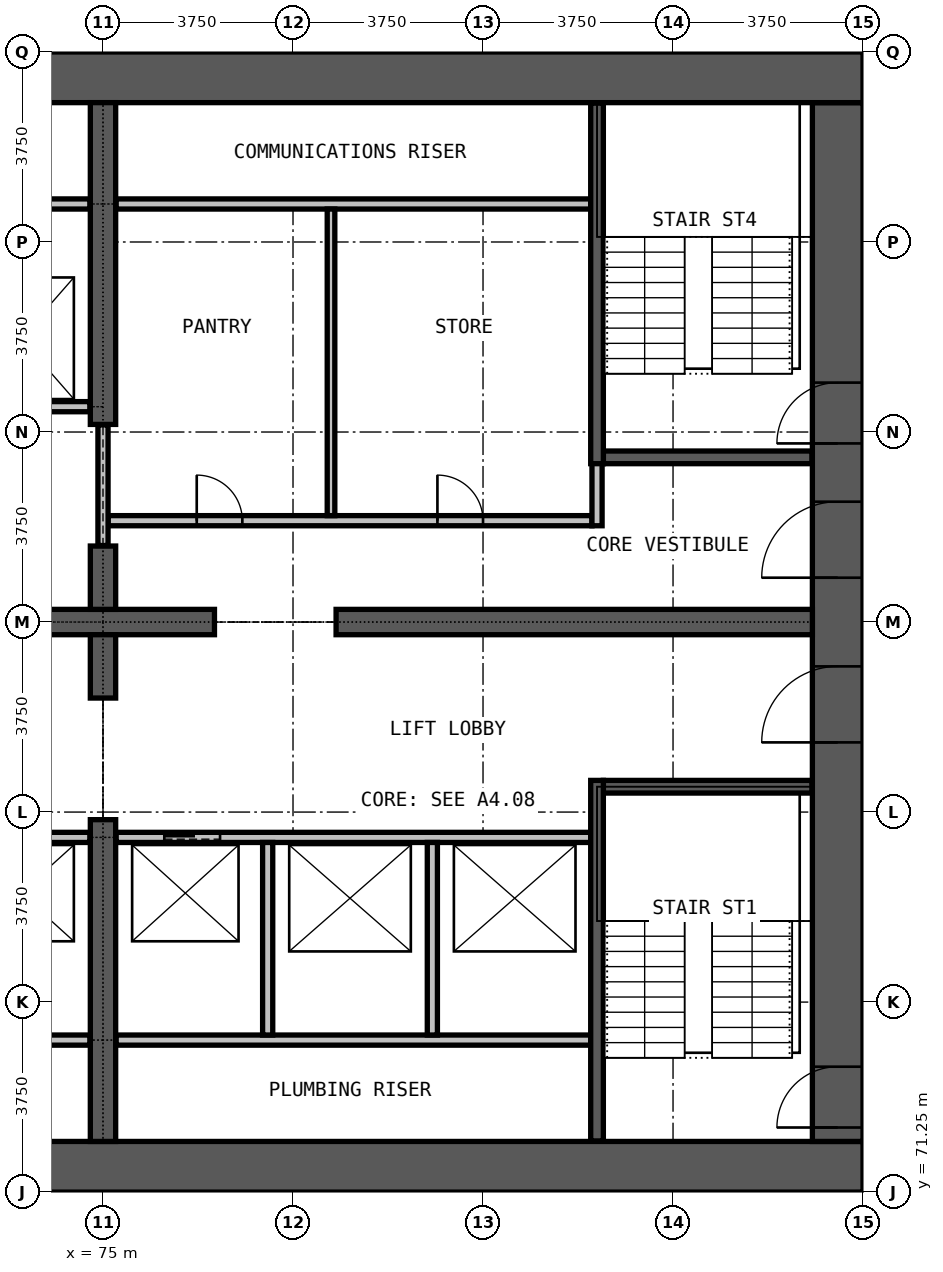
"""IFC4 building model, lengths in metres.
Left out: names, types, materials, properties, quantities, classifications, styles, units other than length and angle.
Written with IfcOpenShell. Run it as: python <this file> out.ifc"""

import sys

from ifc_helpers import new_model, si_unit, direction, frame, frame_2d, origin, place, context, subcontext, project, spatial, rectangle, extrude, element, fill, save


model = new_model("IFC4")
c1 = context("Model", 3, precision=1e-05, world=origin(), true_north=direction((0.0, 1.0)))
c2 = subcontext(c1, "Body", "Model", "MODEL_VIEW")
j1 = project(units=[si_unit("LENGTHUNIT", "METRE"), si_unit("PLANEANGLEUNIT", "RADIAN")], contexts=[c1])
p1 = place(None, origin())
s1 = spatial("IfcSite", under=j1, at=p1, CompositionType="ELEMENT")
p2 = place(p1, origin())
s2 = spatial("IfcBuilding", under=s1, at=p2, CompositionType="ELEMENT")
p3 = place(p2, frame((0.0, 0.0, 79.1)))
s3 = spatial("IfcBuildingStorey", under=s2, at=p3, CompositionType="ELEMENT", Elevation=79.1)
p4 = place(p3, frame((60.0, 71.75, 0.0), z_axis=(0.0, 0.0, 1.0), x_axis=(1.0, 0.0, 0.0)))
e1 = element("IfcWall", 1, at=p4, inside=s3, PredefinedType="SHEAR", context=c2, shape_type="SweptSolid", body=[
    extrude(rectangle(XDim=30.0, YDim=1.0, at=frame_2d((15.0, 0.0))), origin(), (0.0, 0.0, 1.0), 3.3),
])
p5 = place(p3, frame((89.5, 72.25, 0.0), z_axis=(0.0, 0.0, 1.0), x_axis=(0.0, 1.0, 0.0)))
e2 = element("IfcWall", 2, at=p5, inside=s3, PredefinedType="SHEAR", context=c2, shape_type="SweptSolid", body=[
    extrude(rectangle(XDim=20.5, YDim=1.0, at=frame_2d((10.25, 0.0))), origin(), (0.0, 0.0, 1.0), 3.3),
])
p6 = place(p5, frame((0.275, 0.0, 0.0)))
e3 = element("IfcOpeningElement", 3, at=p6, cuts=e2, PredefinedType="OPENING", context=c2, shape_type="SweptSolid", body=[
    extrude(rectangle(XDim=1.2, YDim=2.2, at=frame_2d((0.6, 1.1))), frame((0.0, 0.51, 0.0), z_axis=(0.0, -1.0, 0.0), x_axis=(1.0, 0.0, 0.0)), (0.0, 0.0, 1.0), 1.02),
])
p7 = place(p5, frame((13.775, 0.0, 0.0)))
e4 = element("IfcOpeningElement", 4, at=p7, cuts=e2, PredefinedType="OPENING", context=c2, shape_type="SweptSolid", body=[
    extrude(rectangle(XDim=1.2, YDim=2.2, at=frame_2d((0.6, 1.1))), frame((0.0, 0.51, 0.0), z_axis=(0.0, -1.0, 0.0), x_axis=(1.0, 0.0, 0.0)), (0.0, 0.0, 1.0), 1.02),
])
p8 = place(p5, frame((7.875, 0.0, 0.0)))
e5 = element("IfcOpeningElement", 5, at=p8, cuts=e2, PredefinedType="OPENING", context=c2, shape_type="SweptSolid", body=[
    extrude(rectangle(XDim=1.5, YDim=2.2, at=frame_2d((0.75, 1.1))), frame((0.0, 0.51, 0.0), z_axis=(0.0, -1.0, 0.0), x_axis=(1.0, 0.0, 0.0)), (0.0, 0.0, 1.0), 1.02),
])
p9 = place(p5, frame((11.125, 0.0, 0.0)))
e6 = element("IfcOpeningElement", 6, at=p9, cuts=e2, PredefinedType="OPENING", context=c2, shape_type="SweptSolid", body=[
    extrude(rectangle(XDim=1.5, YDim=2.2, at=frame_2d((0.75, 1.1))), frame((0.0, 0.51, 0.0), z_axis=(0.0, -1.0, 0.0), x_axis=(1.0, 0.0, 0.0)), (0.0, 0.0, 1.0), 1.02),
])
p10 = place(p3, frame((90.0, 93.25, 0.0), z_axis=(0.0, 0.0, 1.0), x_axis=(-1.0, 0.0, 0.0)))
e7 = element("IfcWall", 7, at=p10, inside=s3, PredefinedType="SHEAR", context=c2, shape_type="SweptSolid", body=[
    extrude(rectangle(XDim=30.0, YDim=1.0, at=frame_2d((15.0, 0.0))), origin(), (0.0, 0.0, 1.0), 3.3),
])
p11 = place(p3, frame((72.8, 82.5, 0.0), z_axis=(0.0, 0.0, 1.0), x_axis=(1.0, 0.0, 0.0)))
e8 = element("IfcWall", 8, at=p11, inside=s3, PredefinedType="SHEAR", context=c2, shape_type="SweptSolid", body=[
    extrude(rectangle(XDim=4.4, YDim=0.5, at=frame_2d((2.2, 0.0))), origin(), (0.0, 0.0, 1.0), 3.3),
])
p12 = place(p3, frame((79.6, 82.5, 0.0), z_axis=(0.0, 0.0, 1.0), x_axis=(1.0, 0.0, 0.0)))
e9 = element("IfcWall", 9, at=p12, inside=s3, PredefinedType="SHEAR", context=c2, shape_type="SweptSolid", body=[
    extrude(rectangle(XDim=9.4, YDim=0.5, at=frame_2d((4.7, 0.0))), origin(), (0.0, 0.0, 1.0), 3.3),
])
p13 = place(p3, frame((75.0, 72.25, 0.0), z_axis=(0.0, 0.0, 1.0), x_axis=(0.0, 1.0, 0.0)))
e10 = element("IfcWall", 10, at=p13, inside=s3, PredefinedType="SHEAR", context=c2, shape_type="SweptSolid", body=[
    extrude(rectangle(XDim=6.35, YDim=0.5, at=frame_2d((3.175, 0.0))), origin(), (0.0, 0.0, 1.0), 3.3),
])
for number, where, z_axis, x_axis in (
    (11, (75.0, 81.0, 0.0), (0.0, 0.0, 1.0), (0.0, 1.0, 0.0)),
    (12, (75.0, 82.75, 0.0), (0.0, 0.0, 1.0), (0.0, 1.0, 0.0)),
):
    element("IfcWall", number, at=place(p3, frame(where, z_axis=z_axis, x_axis=x_axis)), inside=s3, PredefinedType="SHEAR", context=c2, shape_type="SweptSolid", body=[
        extrude(rectangle(XDim=1.25, YDim=0.5, at=frame_2d((0.625, 0.0))), origin(), (0.0, 0.0, 1.0), 3.3),
    ])
p14 = place(p3, frame((75.0, 86.4, 0.0), z_axis=(0.0, 0.0, 1.0), x_axis=(0.0, 1.0, 0.0)))
e13 = element("IfcWall", 13, at=p14, inside=s3, PredefinedType="SHEAR", context=c2, shape_type="SweptSolid", body=[
    extrude(rectangle(XDim=6.35, YDim=0.5, at=frame_2d((3.175, 0.0))), origin(), (0.0, 0.0, 1.0), 3.3),
])
p15 = place(p3, frame((75.1, 84.5, 0.0), z_axis=(0.0, 0.0, 1.0), x_axis=(1.0, 0.0, 0.0)))
e14 = element("IfcWall", 14, at=p15, inside=s3, PredefinedType="PARTITIONING", context=c2, shape_type="SweptSolid", body=[
    extrude(rectangle(XDim=9.55, YDim=0.2, at=frame_2d((4.775, 0.0))), origin(), (0.0, 0.0, 1.0), 3.0),
])
p16 = place(p15, frame((1.75, 0.0, 0.0)))
e15 = element("IfcOpeningElement", 15, at=p16, cuts=e14, PredefinedType="OPENING", context=c2, shape_type="SweptSolid", body=[
    extrude(rectangle(XDim=0.9, YDim=2.2, at=frame_2d((0.45, 1.1))), frame((0.0, 0.11, 0.0), z_axis=(0.0, -1.0, 0.0), x_axis=(1.0, 0.0, 0.0)), (0.0, 0.0, 1.0), 0.22),
])
p17 = place(p15, frame((6.5, 0.0, 0.0)))
e16 = element("IfcOpeningElement", 16, at=p17, cuts=e14, PredefinedType="OPENING", context=c2, shape_type="SweptSolid", body=[
    extrude(rectangle(XDim=0.9, YDim=2.2, at=frame_2d((0.45, 1.1))), frame((0.0, 0.11, 0.0), z_axis=(0.0, -1.0, 0.0), x_axis=(1.0, 0.0, 0.0)), (0.0, 0.0, 1.0), 0.22),
])
p18 = place(p3, frame((75.26, 90.75, 0.0), z_axis=(0.0, 0.0, 1.0), x_axis=(1.0, 0.0, 0.0)))
e17 = element("IfcWall", 17, at=p18, inside=s3, PredefinedType="PARTITIONING", context=c2, shape_type="SweptSolid", body=[
    extrude(rectangle(XDim=9.365, YDim=0.2, at=frame_2d((4.683, 0.0))), origin(), (0.0, 0.0, 1.0), 3.0),
])
p19 = place(p3, frame((75.0, 84.01, 0.0), z_axis=(0.0, 0.0, 1.0), x_axis=(0.0, 1.0, 0.0)))
e18 = element("IfcWall", 18, at=p19, inside=s3, PredefinedType="PARTITIONING", context=c2, shape_type="SweptSolid", body=[
    extrude(rectangle(XDim=2.38, YDim=0.2, at=frame_2d((1.19, 0.0))), origin(), (0.0, 0.0, 1.0), 2.4),
])
p20 = place(p3, frame((84.75, 84.4, 0.0), z_axis=(0.0, 0.0, 1.0), x_axis=(0.0, 1.0, 0.0)))
e19 = element("IfcWall", 19, at=p20, inside=s3, PredefinedType="PARTITIONING", context=c2, shape_type="SweptSolid", body=[
    extrude(rectangle(XDim=1.475, YDim=0.2, at=frame_2d((0.738, 0.0))), origin(), (0.0, 0.0, 1.0), 3.0),
])
p21 = place(p3, frame((79.5, 84.6, 0.0), z_axis=(0.0, 0.0, 1.0), x_axis=(0.0, 1.0, 0.0)))
e20 = element("IfcWall", 20, at=p21, inside=s3, PredefinedType="PARTITIONING", context=c2, shape_type="SweptSolid", body=[
    extrude(rectangle(XDim=6.05, YDim=0.15, at=frame_2d((3.025, 0.0))), origin(), (0.0, 0.0, 1.0), 3.0),
])
for number, where, z_axis, x_axis in (
    (21, (65.375, 74.25, 0.0), (0.0, 0.0, 1.0), (1.0, 0.0, 0.0)),
    (22, (75.26, 74.25, 0.0), (0.0, 0.0, 1.0), (1.0, 0.0, 0.0)),
):
    element("IfcWall", number, at=place(p3, frame(where, z_axis=z_axis, x_axis=x_axis)), inside=s3, PredefinedType="PARTITIONING", context=c2, shape_type="SweptSolid", body=[
        extrude(rectangle(XDim=9.365, YDim=0.2, at=frame_2d((4.683, 0.0))), origin(), (0.0, 0.0, 1.0), 3.0),
    ])
p22 = place(p3, frame((65.375, 78.25, 0.0), z_axis=(0.0, 0.0, 1.0), x_axis=(1.0, 0.0, 0.0)))
e23 = element("IfcWall", 23, at=p22, inside=s3, PredefinedType="PARTITIONING", context=c2, shape_type="SweptSolid", body=[
    extrude(rectangle(XDim=9.365, YDim=0.2, at=frame_2d((4.683, 0.0))), origin(), (0.0, 0.0, 1.0), 3.0),
])
p23 = place(p22, frame((1.0, 0.0, 0.0)))
e24 = element("IfcOpeningElement", 24, at=p23, cuts=e23, PredefinedType="OPENING", context=c2, shape_type="SweptSolid", body=[
    extrude(rectangle(XDim=1.1, YDim=2.2, at=frame_2d((0.55, 1.1))), frame((0.0, 0.11, 0.0), z_axis=(0.0, -1.0, 0.0), x_axis=(1.0, 0.0, 0.0)), (0.0, 0.0, 1.0), 0.22),
])
p24 = place(p22, frame((4.175, 0.0, 0.0)))
e25 = element("IfcOpeningElement", 25, at=p24, cuts=e23, PredefinedType="OPENING", context=c2, shape_type="SweptSolid", body=[
    extrude(rectangle(XDim=1.1, YDim=2.2, at=frame_2d((0.55, 1.1))), frame((0.0, 0.11, 0.0), z_axis=(0.0, -1.0, 0.0), x_axis=(1.0, 0.0, 0.0)), (0.0, 0.0, 1.0), 0.22),
])
p25 = place(p22, frame((7.325, 0.0, 0.0)))
e26 = element("IfcOpeningElement", 26, at=p25, cuts=e23, PredefinedType="OPENING", context=c2, shape_type="SweptSolid", body=[
    extrude(rectangle(XDim=1.1, YDim=2.2, at=frame_2d((0.55, 1.1))), frame((0.0, 0.11, 0.0), z_axis=(0.0, -1.0, 0.0), x_axis=(1.0, 0.0, 0.0)), (0.0, 0.0, 1.0), 0.22),
])
p26 = place(p3, frame((75.26, 78.25, 0.0), z_axis=(0.0, 0.0, 1.0), x_axis=(1.0, 0.0, 0.0)))
e27 = element("IfcWall", 27, at=p26, inside=s3, PredefinedType="PARTITIONING", context=c2, shape_type="SweptSolid", body=[
    extrude(rectangle(XDim=9.365, YDim=0.2, at=frame_2d((4.683, 0.0))), origin(), (0.0, 0.0, 1.0), 3.0),
])
p27 = place(p26, frame((0.95, 0.0, 0.0)))
e28 = element("IfcOpeningElement", 28, at=p27, cuts=e27, PredefinedType="OPENING", context=c2, shape_type="SweptSolid", body=[
    extrude(rectangle(XDim=1.1, YDim=2.2, at=frame_2d((0.55, 1.1))), frame((0.0, 0.11, 0.0), z_axis=(0.0, -1.0, 0.0), x_axis=(1.0, 0.0, 0.0)), (0.0, 0.0, 1.0), 0.22),
])
p28 = place(p3, frame((65.375, 86.75, 0.0), z_axis=(0.0, 0.0, 1.0), x_axis=(1.0, 0.0, 0.0)))
e29 = element("IfcWall", 29, at=p28, inside=s3, PredefinedType="PARTITIONING", context=c2, shape_type="SweptSolid", body=[
    extrude(rectangle(XDim=9.365, YDim=0.2, at=frame_2d((4.683, 0.0))), origin(), (0.0, 0.0, 1.0), 3.0),
])
p29 = place(p28, frame((1.0, 0.0, 0.0)))
e30 = element("IfcOpeningElement", 30, at=p29, cuts=e29, PredefinedType="OPENING", context=c2, shape_type="SweptSolid", body=[
    extrude(rectangle(XDim=1.1, YDim=2.2, at=frame_2d((0.55, 1.1))), frame((0.0, 0.11, 0.0), z_axis=(0.0, -1.0, 0.0), x_axis=(1.0, 0.0, 0.0)), (0.0, 0.0, 1.0), 0.22),
])
p30 = place(p28, frame((4.175, 0.0, 0.0)))
e31 = element("IfcOpeningElement", 31, at=p30, cuts=e29, PredefinedType="OPENING", context=c2, shape_type="SweptSolid", body=[
    extrude(rectangle(XDim=1.1, YDim=2.2, at=frame_2d((0.55, 1.1))), frame((0.0, 0.11, 0.0), z_axis=(0.0, -1.0, 0.0), x_axis=(1.0, 0.0, 0.0)), (0.0, 0.0, 1.0), 0.22),
])
p31 = place(p28, frame((7.325, 0.0, 0.0)))
e32 = element("IfcOpeningElement", 32, at=p31, cuts=e29, PredefinedType="OPENING", context=c2, shape_type="SweptSolid", body=[
    extrude(rectangle(XDim=1.1, YDim=2.2, at=frame_2d((0.55, 1.1))), frame((0.0, 0.11, 0.0), z_axis=(0.0, -1.0, 0.0), x_axis=(1.0, 0.0, 0.0)), (0.0, 0.0, 1.0), 0.22),
])
p32 = place(p3, frame((65.375, 90.75, 0.0), z_axis=(0.0, 0.0, 1.0), x_axis=(1.0, 0.0, 0.0)))
e33 = element("IfcWall", 33, at=p32, inside=s3, PredefinedType="PARTITIONING", context=c2, shape_type="SweptSolid", body=[
    extrude(rectangle(XDim=9.365, YDim=0.2, at=frame_2d((4.683, 0.0))), origin(), (0.0, 0.0, 1.0), 3.0),
])
for number, where, z_axis, x_axis in (
    (34, (78.25, 74.35, 0.0), (0.0, 0.0, 1.0), (0.0, 1.0, 0.0)),
    (35, (81.5, 74.35, 0.0), (0.0, 0.0, 1.0), (0.0, 1.0, 0.0)),
):
    element("IfcWall", number, at=place(p3, frame(where, z_axis=z_axis, x_axis=x_axis)), inside=s3, PredefinedType="PARTITIONING", context=c2, shape_type="SweptSolid", body=[
        extrude(rectangle(XDim=3.8, YDim=0.2, at=frame_2d((1.9, 0.0))), origin(), (0.0, 0.0, 1.0), 3.0),
    ])
for number, where, z_axis, x_axis in (
    (36, (84.875, 79.25, 0.0), (0.0, 0.0, 1.0), (1.0, 0.0, 0.0)),
    (37, (84.875, 85.75, 0.0), (0.0, 0.0, 1.0), (1.0, 0.0, 0.0)),
):
    element("IfcWall", number, at=place(p3, frame(where, z_axis=z_axis, x_axis=x_axis)), inside=s3, PredefinedType="PARTITIONING", context=c2, shape_type="SweptSolid", body=[
        extrude(rectangle(XDim=4.115, YDim=0.25, at=frame_2d((2.058, 0.0))), origin(), (0.0, 0.0, 1.0), 3.0),
    ])
for number, where, z_axis, x_axis in (
    (38, (84.75, 72.26, 0.0), (0.0, 0.0, 1.0), (0.0, 1.0, 0.0)),
    (39, (84.75, 85.625, 0.0), (0.0, 0.0, 1.0), (0.0, 1.0, 0.0)),
):
    element("IfcWall", number, at=place(p3, frame(where, z_axis=z_axis, x_axis=x_axis)), inside=s3, PredefinedType="PARTITIONING", context=c2, shape_type="SweptSolid", body=[
        extrude(rectangle(XDim=7.115, YDim=0.25, at=frame_2d((3.558, 0.0))), origin(), (0.0, 0.0, 1.0), 3.0),
    ])
p33 = place(p27, origin())
e40 = element("IfcDoor", 40, at=p33, inside=s3, OperationType="DOUBLE_DOOR_SLIDING", PredefinedType="DOOR", context=c2, shape_type="SweptSolid", body=[
    extrude(rectangle(XDim=1.1, YDim=2.2, at=frame_2d((0.55, 1.1))), frame((0.0, 0.025, 0.0), z_axis=(0.0, -1.0, 0.0), x_axis=(1.0, 0.0, 0.0)), (0.0, 0.0, 1.0), 0.05),
])
fill(e28, e40)
p34 = place(p6, origin())
e41 = element("IfcDoor", 41, at=p34, inside=s3, OperationType="SINGLE_SWING_LEFT", PredefinedType="DOOR", context=c2, shape_type="SweptSolid", body=[
    extrude(rectangle(XDim=1.2, YDim=2.2, at=frame_2d((0.6, 1.1))), frame((0.0, 0.025, 0.0), z_axis=(0.0, -1.0, 0.0), x_axis=(1.0, 0.0, 0.0)), (0.0, 0.0, 1.0), 0.05),
])
fill(e3, e41)
p35 = place(p7, origin())
e42 = element("IfcDoor", 42, at=p35, inside=s3, OperationType="SINGLE_SWING_RIGHT", PredefinedType="DOOR", context=c2, shape_type="SweptSolid", body=[
    extrude(rectangle(XDim=1.2, YDim=2.2, at=frame_2d((0.6, 1.1))), frame((0.0, 0.025, 0.0), z_axis=(0.0, -1.0, 0.0), x_axis=(1.0, 0.0, 0.0)), (0.0, 0.0, 1.0), 0.05),
])
fill(e4, e42)
p36 = place(p8, origin())
e43 = element("IfcDoor", 43, at=p36, inside=s3, OperationType="DOUBLE_DOOR_SINGLE_SWING", PredefinedType="DOOR", context=c2, shape_type="SweptSolid", body=[
    extrude(rectangle(XDim=1.5, YDim=2.2, at=frame_2d((0.75, 1.1))), frame((0.0, 0.025, 0.0), z_axis=(0.0, -1.0, 0.0), x_axis=(1.0, 0.0, 0.0)), (0.0, 0.0, 1.0), 0.05),
])
fill(e5, e43)
p37 = place(p9, origin())
e44 = element("IfcDoor", 44, at=p37, inside=s3, OperationType="DOUBLE_DOOR_SINGLE_SWING", PredefinedType="DOOR", context=c2, shape_type="SweptSolid", body=[
    extrude(rectangle(XDim=1.5, YDim=2.2, at=frame_2d((0.75, 1.1))), frame((0.0, 0.025, 0.0), z_axis=(0.0, -1.0, 0.0), x_axis=(1.0, 0.0, 0.0)), (0.0, 0.0, 1.0), 0.05),
])
fill(e6, e44)
p38 = place(p16, origin())
e45 = element("IfcDoor", 45, at=p38, inside=s3, OperationType="SINGLE_SWING_LEFT", PredefinedType="DOOR", context=c2, shape_type="SweptSolid", body=[
    extrude(rectangle(XDim=0.9, YDim=2.2, at=frame_2d((0.45, 1.1))), frame((0.0, 0.025, 0.0), z_axis=(0.0, -1.0, 0.0), x_axis=(1.0, 0.0, 0.0)), (0.0, 0.0, 1.0), 0.05),
])
fill(e15, e45)
p39 = place(p17, origin())
e46 = element("IfcDoor", 46, at=p39, inside=s3, OperationType="SINGLE_SWING_RIGHT", PredefinedType="DOOR", context=c2, shape_type="SweptSolid", body=[
    extrude(rectangle(XDim=0.9, YDim=2.2, at=frame_2d((0.45, 1.1))), frame((0.0, 0.025, 0.0), z_axis=(0.0, -1.0, 0.0), x_axis=(1.0, 0.0, 0.0)), (0.0, 0.0, 1.0), 0.05),
])
fill(e16, e46)
save(model, sys.argv[1])
